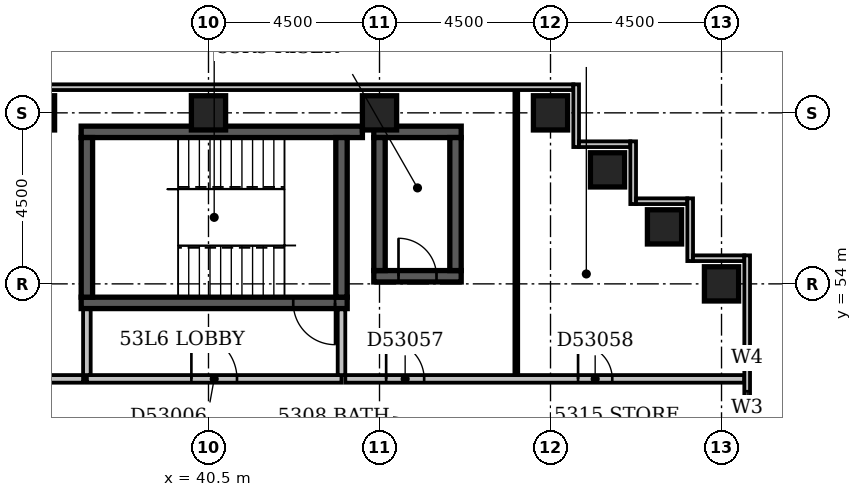
"""IFC4 building model, lengths in metres.
Left out: names, types, materials, properties, quantities, classifications, styles, units other than length and angle.
Written with IfcOpenShell. Run it as: python <this file> out.ifc"""

import sys

from ifc_helpers import new_model, si_unit, direction, frame, frame_2d, origin, origin_2d, place, context, subcontext, project, spatial, rectangle, extrude, element, fill, save


model = new_model("IFC4")
c1 = context("Model", 3, precision=1e-05, world=origin(), true_north=direction((0.0, 1.0)))
c2 = subcontext(c1, "Body", "Model", "MODEL_VIEW")
j1 = project(units=[si_unit("LENGTHUNIT", "METRE"), si_unit("PLANEANGLEUNIT", "RADIAN")], contexts=[c1])
p1 = place(None, origin())
s1 = spatial("IfcSite", under=j1, at=p1, CompositionType="ELEMENT")
p2 = place(p1, origin())
s2 = spatial("IfcBuilding", under=s1, at=p2, CompositionType="ELEMENT")
p3 = place(p2, frame((0.0, 0.0, 207.8)))
s3 = spatial("IfcBuildingStorey", under=s2, at=p3, CompositionType="ELEMENT", Elevation=207.8)
p4 = place(p3, frame((37.15, 53.5, -0.3), z_axis=(0.0, 0.0, 1.0), x_axis=(1.0, 0.0, 0.0)))
e1 = element("IfcWall", 1, at=p4, inside=s3, PredefinedType="SHEAR", context=c2, shape_type="SweptSolid", body=[
    extrude(rectangle(XDim=7.0, YDim=0.3, at=frame_2d((3.5, 0.0))), origin(), (0.0, 0.0, 1.0), 3.55),
])
p5 = place(p4, frame((5.58, 0.0, 0.3)))
e2 = element("IfcOpeningElement", 2, at=p5, cuts=e1, PredefinedType="OPENING", context=c2, shape_type="SweptSolid", body=[
    extrude(rectangle(XDim=1.1, YDim=2.1, at=frame_2d((0.55, 1.05))), frame((0.0, 0.162, 0.0), z_axis=(0.0, -1.0, 0.0), x_axis=(1.0, 0.0, 0.0)), (0.0, 0.0, 1.0), 0.324),
])
p6 = place(p3, frame((37.15, 58.0, -0.3), z_axis=(0.0, 0.0, 1.0), x_axis=(1.0, 0.0, 0.0)))
e3 = element("IfcWall", 3, at=p6, inside=s3, PredefinedType="SHEAR", context=c2, shape_type="SweptSolid", body=[
    extrude(rectangle(XDim=7.4, YDim=0.3, at=frame_2d((3.7, 0.0))), origin(), (0.0, 0.0, 1.0), 3.55),
])
for number, where, z_axis, x_axis in (
    (4, (37.3, 53.65, -0.3), (0.0, 0.0, 1.0), (0.0, 1.0, 0.0)),
    (5, (44.0, 53.65, -0.3), (0.0, 0.0, 1.0), (0.0, 1.0, 0.0)),
):
    element("IfcWall", number, at=place(p3, frame(where, z_axis=z_axis, x_axis=x_axis)), inside=s3, PredefinedType="SHEAR", context=c2, shape_type="SweptSolid", body=[
        extrude(rectangle(XDim=4.2, YDim=0.3, at=frame_2d((2.1, 0.0))), origin(), (0.0, 0.0, 1.0), 3.55),
    ])
p7 = place(p3, frame((44.85, 54.2, -0.3), z_axis=(0.0, 0.0, 1.0), x_axis=(1.0, 0.0, 0.0)))
e6 = element("IfcWall", 6, at=p7, inside=s3, PredefinedType="SHEAR", context=c2, shape_type="SweptSolid", body=[
    extrude(rectangle(XDim=2.3, YDim=0.3, at=frame_2d((1.15, 0.0))), origin(), (0.0, 0.0, 1.0), 3.55),
])
p8 = place(p7, frame((0.65, 0.0, 0.3)))
e7 = element("IfcOpeningElement", 7, at=p8, cuts=e6, PredefinedType="OPENING", context=c2, shape_type="SweptSolid", body=[
    extrude(rectangle(XDim=1.0, YDim=2.1, at=frame_2d((0.5, 1.05))), frame((0.0, 0.162, 0.0), z_axis=(0.0, -1.0, 0.0), x_axis=(1.0, 0.0, 0.0)), (0.0, 0.0, 1.0), 0.324),
])
p9 = place(p3, frame((44.85, 58.0, -0.3), z_axis=(0.0, 0.0, 1.0), x_axis=(1.0, 0.0, 0.0)))
e8 = element("IfcWall", 8, at=p9, inside=s3, PredefinedType="SHEAR", context=c2, shape_type="SweptSolid", body=[
    extrude(rectangle(XDim=2.3, YDim=0.3, at=frame_2d((1.15, 0.0))), origin(), (0.0, 0.0, 1.0), 3.55),
])
for number, where, z_axis, x_axis in (
    (9, (45.0, 54.35, -0.3), (0.0, 0.0, 1.0), (0.0, 1.0, 0.0)),
    (10, (47.0, 54.35, -0.3), (0.0, 0.0, 1.0), (0.0, 1.0, 0.0)),
):
    element("IfcWall", number, at=place(p3, frame(where, z_axis=z_axis, x_axis=x_axis)), inside=s3, PredefinedType="SHEAR", context=c2, shape_type="SweptSolid", body=[
        extrude(rectangle(XDim=3.5, YDim=0.3, at=frame_2d((1.75, 0.0))), origin(), (0.0, 0.0, 1.0), 3.55),
    ])
for number, where, z_axis, x_axis in (
    (11, (54.0, 54.0, -0.3), (0.0, 0.0, 1.0), (1.0, 0.0, 0.0)),
    (12, (52.5, 55.5, -0.3), (0.0, 0.0, 1.0), (1.0, 0.0, 0.0)),
    (13, (51.0, 57.0, -0.3), (0.0, 0.0, 1.0), (1.0, 0.0, 0.0)),
    (14, (36.0, 58.5, -0.3), (0.0, 0.0, 1.0), (1.0, 0.0, 0.0)),
    (15, (40.5, 58.5, -0.3), (0.0, 0.0, 1.0), (1.0, 0.0, 0.0)),
    (16, (45.0, 58.5, -0.3), (0.0, 0.0, 1.0), (1.0, 0.0, 0.0)),
    (17, (49.5, 58.5, -0.3), (0.0, 0.0, 1.0), (1.0, 0.0, 0.0)),
):
    element("IfcColumn", number, at=place(p3, frame(where, z_axis=z_axis, x_axis=x_axis)), inside=s3, PredefinedType="COLUMN", context=c2, shape_type="SweptSolid", body=[
        extrude(rectangle(XDim=0.9, YDim=0.9, at=origin_2d()), origin(), (0.0, 0.0, 1.0), 3.55),
    ])
p10 = place(p3, frame((54.675, 39.9, 0.0), z_axis=(0.0, 0.0, 1.0), x_axis=(0.0, 1.0, 0.0)))
e18 = element("IfcWall", 18, at=p10, inside=s3, PredefinedType="STANDARD", context=c2, shape_type="SweptSolid", body=[
    extrude(rectangle(XDim=14.85, YDim=0.15, at=frame_2d((7.425, 0.0))), origin(), (0.0, 0.0, 1.0), 2.7),
])
p11 = place(p10, frame((1.65, 0.0, 0.6)))
e19 = element("IfcOpeningElement", 19, at=p11, cuts=e18, PredefinedType="OPENING", context=c2, shape_type="SweptSolid", body=[
    extrude(rectangle(XDim=2.4, YDim=1.8, at=frame_2d((1.2, 0.9))), frame((0.0, 0.087, 0.0), z_axis=(0.0, -1.0, 0.0), x_axis=(1.0, 0.0, 0.0)), (0.0, 0.0, 1.0), 0.174),
])
p12 = place(p10, frame((6.15, 0.0, 0.6)))
e20 = element("IfcOpeningElement", 20, at=p12, cuts=e18, PredefinedType="OPENING", context=c2, shape_type="SweptSolid", body=[
    extrude(rectangle(XDim=2.4, YDim=1.8, at=frame_2d((1.2, 0.9))), frame((0.0, 0.087, 0.0), z_axis=(0.0, -1.0, 0.0), x_axis=(1.0, 0.0, 0.0)), (0.0, 0.0, 1.0), 0.174),
])
p13 = place(p10, frame((10.375, 0.0, 0.6)))
e21 = element("IfcOpeningElement", 21, at=p13, cuts=e18, PredefinedType="OPENING", context=c2, shape_type="SweptSolid", body=[
    extrude(rectangle(XDim=0.9, YDim=1.8, at=frame_2d((0.45, 0.9))), frame((0.0, 0.087, 0.0), z_axis=(0.0, -1.0, 0.0), x_axis=(1.0, 0.0, 0.0)), (0.0, 0.0, 1.0), 0.174),
])
p14 = place(p10, frame((11.848, 0.0, 0.6)))
e22 = element("IfcOpeningElement", 22, at=p14, cuts=e18, PredefinedType="OPENING", context=c2, shape_type="SweptSolid", body=[
    extrude(rectangle(XDim=0.6, YDim=1.8, at=frame_2d((0.3, 0.9))), frame((0.0, 0.087, 0.0), z_axis=(0.0, -1.0, 0.0), x_axis=(1.0, 0.0, 0.0)), (0.0, 0.0, 1.0), 0.174),
])
p15 = place(p3, frame((54.6, 54.675, 0.0), z_axis=(0.0, 0.0, 1.0), x_axis=(-1.0, 0.0, 0.0)))
e23 = element("IfcWall", 23, at=p15, inside=s3, PredefinedType="STANDARD", context=c2, shape_type="SweptSolid", body=[
    extrude(rectangle(XDim=1.35, YDim=0.15, at=frame_2d((0.675, 0.0))), origin(), (0.0, 0.0, 1.0), 2.7),
])
p16 = place(p3, frame((53.175, 54.6, 0.0), z_axis=(0.0, 0.0, 1.0), x_axis=(0.0, 1.0, 0.0)))
e24 = element("IfcWall", 24, at=p16, inside=s3, PredefinedType="STANDARD", context=c2, shape_type="SweptSolid", body=[
    extrude(rectangle(XDim=1.65, YDim=0.15, at=frame_2d((0.825, 0.0))), origin(), (0.0, 0.0, 1.0), 2.7),
])
p17 = place(p3, frame((53.1, 56.175, 0.0), z_axis=(0.0, 0.0, 1.0), x_axis=(-1.0, 0.0, 0.0)))
e25 = element("IfcWall", 25, at=p17, inside=s3, PredefinedType="STANDARD", context=c2, shape_type="SweptSolid", body=[
    extrude(rectangle(XDim=1.35, YDim=0.15, at=frame_2d((0.675, 0.0))), origin(), (0.0, 0.0, 1.0), 2.7),
])
p18 = place(p3, frame((51.675, 56.1, 0.0), z_axis=(0.0, 0.0, 1.0), x_axis=(0.0, 1.0, 0.0)))
e26 = element("IfcWall", 26, at=p18, inside=s3, PredefinedType="STANDARD", context=c2, shape_type="SweptSolid", body=[
    extrude(rectangle(XDim=1.65, YDim=0.15, at=frame_2d((0.825, 0.0))), origin(), (0.0, 0.0, 1.0), 2.7),
])
p19 = place(p3, frame((51.6, 57.675, 0.0), z_axis=(0.0, 0.0, 1.0), x_axis=(-1.0, 0.0, 0.0)))
e27 = element("IfcWall", 27, at=p19, inside=s3, PredefinedType="STANDARD", context=c2, shape_type="SweptSolid", body=[
    extrude(rectangle(XDim=1.35, YDim=0.15, at=frame_2d((0.675, 0.0))), origin(), (0.0, 0.0, 1.0), 2.7),
])
p20 = place(p3, frame((50.175, 57.6, 0.0), z_axis=(0.0, 0.0, 1.0), x_axis=(0.0, 1.0, 0.0)))
e28 = element("IfcWall", 28, at=p20, inside=s3, PredefinedType="STANDARD", context=c2, shape_type="SweptSolid", body=[
    extrude(rectangle(XDim=1.65, YDim=0.15, at=frame_2d((0.825, 0.0))), origin(), (0.0, 0.0, 1.0), 2.7),
])
p21 = place(p3, frame((50.1, 59.175, 0.0), z_axis=(0.0, 0.0, 1.0), x_axis=(-1.0, 0.0, 0.0)))
e29 = element("IfcWall", 29, at=p21, inside=s3, PredefinedType="STANDARD", context=c2, shape_type="SweptSolid", body=[
    extrude(rectangle(XDim=50.85, YDim=0.15, at=frame_2d((25.425, 0.0))), origin(), (0.0, 0.0, 1.0), 2.7),
])
p22 = place(p21, frame((19.65, 0.0, 0.6)))
e30 = element("IfcOpeningElement", 30, at=p22, cuts=e29, PredefinedType="OPENING", context=c2, shape_type="SweptSolid", body=[
    extrude(rectangle(XDim=2.4, YDim=1.8, at=frame_2d((1.2, 0.9))), frame((0.0, 0.087, 0.0), z_axis=(0.0, -1.0, 0.0), x_axis=(1.0, 0.0, 0.0)), (0.0, 0.0, 1.0), 0.174),
])
p23 = place(p3, frame((37.3, 51.5, 0.0), z_axis=(0.0, 0.0, 1.0), x_axis=(1.0, 0.0, 0.0)))
e31 = element("IfcWall", 31, at=p23, inside=s3, PredefinedType="PARTITIONING", context=c2, shape_type="SweptSolid", body=[
    extrude(rectangle(XDim=6.7, YDim=0.2, at=frame_2d((3.35, 0.0))), origin(), (0.0, 0.0, 1.0), 3.25),
])
p24 = place(p23, frame((2.75, 0.0, 0.0)))
e32 = element("IfcOpeningElement", 32, at=p24, cuts=e31, PredefinedType="OPENING", context=c2, shape_type="SweptSolid", body=[
    extrude(rectangle(XDim=1.2, YDim=2.1, at=frame_2d((0.6, 1.05))), frame((0.0, 0.112, 0.0), z_axis=(0.0, -1.0, 0.0), x_axis=(1.0, 0.0, 0.0)), (0.0, 0.0, 1.0), 0.224),
])
for number, where, z_axis, x_axis in (
    (33, (44.0, 51.6, 0.0), (0.0, 0.0, 1.0), (0.0, 1.0, 0.0)),
    (34, (37.3, 51.6, 0.0), (0.0, 0.0, 1.0), (0.0, 1.0, 0.0)),
):
    element("IfcWall", number, at=place(p3, frame(where, z_axis=z_axis, x_axis=x_axis)), inside=s3, PredefinedType="PARTITIONING", context=c2, shape_type="SweptSolid", body=[
        extrude(rectangle(XDim=1.73, YDim=0.2, at=frame_2d((0.865, 0.0))), origin(), (0.0, 0.0, 1.0), 3.25),
    ])
p25 = place(p3, frame((27.9, 51.5, 0.0), z_axis=(0.0, 0.0, 1.0), x_axis=(1.0, 0.0, 0.0)))
e35 = element("IfcWall", 35, at=p25, inside=s3, PredefinedType="PARTITIONING", context=c2, shape_type="SweptSolid", body=[
    extrude(rectangle(XDim=9.3, YDim=0.2, at=frame_2d((4.65, 0.0))), origin(), (0.0, 0.0, 1.0), 3.25),
])
p26 = place(p25, frame((0.675, 0.0, 0.0)))
e36 = element("IfcOpeningElement", 36, at=p26, cuts=e35, PredefinedType="OPENING", context=c2, shape_type="SweptSolid", body=[
    extrude(rectangle(XDim=0.9, YDim=2.1, at=frame_2d((0.45, 1.05))), frame((0.0, 0.112, 0.0), z_axis=(0.0, -1.0, 0.0), x_axis=(1.0, 0.0, 0.0)), (0.0, 0.0, 1.0), 0.224),
])
p27 = place(p25, frame((5.375, 0.0, 0.0)))
e37 = element("IfcOpeningElement", 37, at=p27, cuts=e35, PredefinedType="OPENING", context=c2, shape_type="SweptSolid", body=[
    extrude(rectangle(XDim=1.0, YDim=2.1, at=frame_2d((0.5, 1.05))), frame((0.0, 0.112, 0.0), z_axis=(0.0, -1.0, 0.0), x_axis=(1.0, 0.0, 0.0)), (0.0, 0.0, 1.0), 0.224),
])
p28 = place(p3, frame((44.1, 51.5, 0.0), z_axis=(0.0, 0.0, 1.0), x_axis=(1.0, 0.0, 0.0)))
e38 = element("IfcWall", 38, at=p28, inside=s3, PredefinedType="PARTITIONING", context=c2, shape_type="SweptSolid", body=[
    extrude(rectangle(XDim=10.5, YDim=0.2, at=frame_2d((5.25, 0.0))), origin(), (0.0, 0.0, 1.0), 3.25),
])
p29 = place(p28, frame((1.075, 0.0, 0.0)))
e39 = element("IfcOpeningElement", 39, at=p29, cuts=e38, PredefinedType="OPENING", context=c2, shape_type="SweptSolid", body=[
    extrude(rectangle(XDim=1.0, YDim=2.1, at=frame_2d((0.5, 1.05))), frame((0.0, 0.112, 0.0), z_axis=(0.0, -1.0, 0.0), x_axis=(1.0, 0.0, 0.0)), (0.0, 0.0, 1.0), 0.224),
])
p30 = place(p28, frame((6.125, 0.0, 0.0)))
e40 = element("IfcOpeningElement", 40, at=p30, cuts=e38, PredefinedType="OPENING", context=c2, shape_type="SweptSolid", body=[
    extrude(rectangle(XDim=0.9, YDim=2.1, at=frame_2d((0.45, 1.05))), frame((0.0, 0.112, 0.0), z_axis=(0.0, -1.0, 0.0), x_axis=(1.0, 0.0, 0.0)), (0.0, 0.0, 1.0), 0.224),
])
p31 = place(p3, frame((48.6, 51.6, 0.0), z_axis=(0.0, 0.0, 1.0), x_axis=(0.0, 1.0, 0.0)))
e41 = element("IfcWall", 41, at=p31, inside=s3, PredefinedType="PARTITIONING", context=c2, shape_type="SweptSolid", body=[
    extrude(rectangle(XDim=7.5, YDim=0.1, at=frame_2d((3.75, 0.0))), origin(), (0.0, 0.0, 1.0), 3.25),
])
p32 = place(p13, origin())
e42 = element("IfcWindow", 42, at=p32, inside=s3, PartitioningType="SINGLE_PANEL", PredefinedType="WINDOW", context=c2, shape_type="SweptSolid", body=[
    extrude(rectangle(XDim=0.9, YDim=1.8, at=frame_2d((0.45, 0.9))), frame((0.0, 0.03, 0.0), z_axis=(0.0, -1.0, 0.0), x_axis=(1.0, 0.0, 0.0)), (0.0, 0.0, 1.0), 0.06),
])
fill(e21, e42)
p33 = place(p14, origin())
e43 = element("IfcWindow", 43, at=p33, inside=s3, PartitioningType="SINGLE_PANEL", PredefinedType="WINDOW", context=c2, shape_type="SweptSolid", body=[
    extrude(rectangle(XDim=0.6, YDim=1.8, at=frame_2d((0.3, 0.9))), frame((0.0, 0.03, 0.0), z_axis=(0.0, -1.0, 0.0), x_axis=(1.0, 0.0, 0.0)), (0.0, 0.0, 1.0), 0.06),
])
fill(e22, e43)
p34 = place(p24, origin())
e44 = element("IfcDoor", 44, at=p34, inside=s3, OperationType="SINGLE_SWING_LEFT", PredefinedType="DOOR", context=c2, shape_type="SweptSolid", body=[
    extrude(rectangle(XDim=1.2, YDim=2.1, at=frame_2d((0.6, 1.05))), frame((0.0, 0.025, 0.0), z_axis=(0.0, -1.0, 0.0), x_axis=(1.0, 0.0, 0.0)), (0.0, 0.0, 1.0), 0.05),
])
fill(e32, e44)
p35 = place(p8, origin())
e45 = element("IfcDoor", 45, at=p35, inside=s3, OperationType="SINGLE_SWING_LEFT", PredefinedType="DOOR", context=c2, shape_type="SweptSolid", body=[
    extrude(rectangle(XDim=1.0, YDim=2.1, at=frame_2d((0.5, 1.05))), frame((0.0, 0.025, 0.0), z_axis=(0.0, -1.0, 0.0), x_axis=(1.0, 0.0, 0.0)), (0.0, 0.0, 1.0), 0.05),
])
fill(e7, e45)
p36 = place(p5, origin())
e46 = element("IfcDoor", 46, at=p36, inside=s3, OperationType="SINGLE_SWING_RIGHT", PredefinedType="DOOR", context=c2, shape_type="SweptSolid", body=[
    extrude(rectangle(XDim=1.1, YDim=2.1, at=frame_2d((0.55, 1.05))), frame((0.0, 0.025, 0.0), z_axis=(0.0, -1.0, 0.0), x_axis=(1.0, 0.0, 0.0)), (0.0, 0.0, 1.0), 0.05),
])
fill(e2, e46)
p37 = place(p29, origin())
e47 = element("IfcDoor", 47, at=p37, inside=s3, OperationType="SINGLE_SWING_LEFT", PredefinedType="DOOR", context=c2, shape_type="SweptSolid", body=[
    extrude(rectangle(XDim=1.0, YDim=2.1, at=frame_2d((0.5, 1.05))), frame((0.0, 0.025, 0.0), z_axis=(0.0, -1.0, 0.0), x_axis=(1.0, 0.0, 0.0)), (0.0, 0.0, 1.0), 0.05),
])
fill(e39, e47)
p38 = place(p30, origin())
e48 = element("IfcDoor", 48, at=p38, inside=s3, OperationType="SINGLE_SWING_LEFT", PredefinedType="DOOR", context=c2, shape_type="SweptSolid", body=[
    extrude(rectangle(XDim=0.9, YDim=2.1, at=frame_2d((0.45, 1.05))), frame((0.0, 0.025, 0.0), z_axis=(0.0, -1.0, 0.0), x_axis=(1.0, 0.0, 0.0)), (0.0, 0.0, 1.0), 0.05),
])
fill(e40, e48)
save(model, sys.argv[1])
